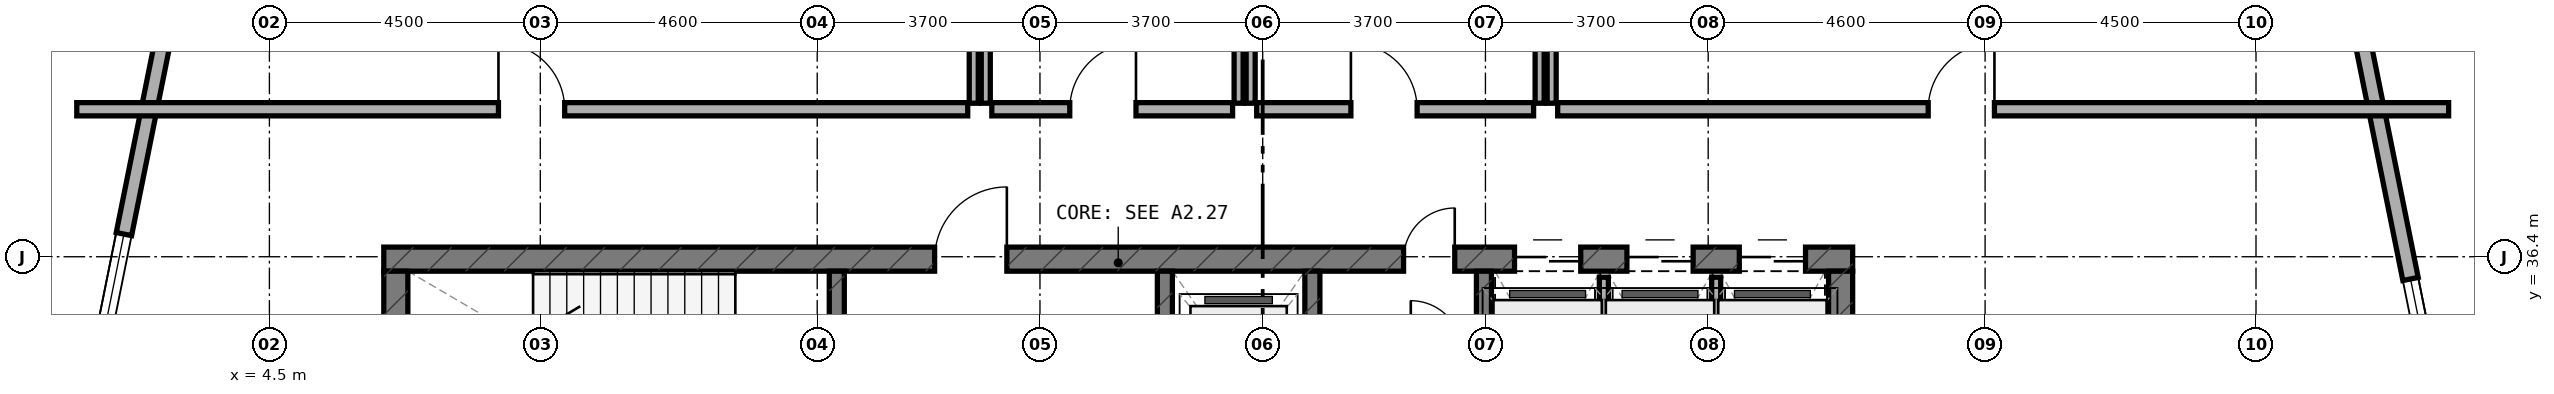
"""IFC4 building model, lengths in metres.
Left out: names, types, materials, properties, quantities, classifications, styles, units other than length and angle.
Written with IfcOpenShell. Run it as: python <this file> out.ifc"""

import sys

from ifc_helpers import new_model, si_unit, direction, frame, frame_2d, origin, place, context, subcontext, project, spatial, rectangle, extrude, element, fill, save


model = new_model("IFC4")
c1 = context("Model", 3, precision=1e-05, world=origin(), true_north=direction((0.0, 1.0)))
c2 = subcontext(c1, "Body", "Model", "MODEL_VIEW")
j1 = project(units=[si_unit("LENGTHUNIT", "METRE"), si_unit("PLANEANGLEUNIT", "RADIAN")], contexts=[c1])
p1 = place(None, origin())
s1 = spatial("IfcSite", under=j1, at=p1, CompositionType="ELEMENT")
p2 = place(p1, origin())
s2 = spatial("IfcBuilding", under=s1, at=p2, CompositionType="ELEMENT")
p3 = place(p2, frame((0.0, 0.0, 119.5)))
s3 = spatial("IfcBuildingStorey", under=s2, at=p3, CompositionType="ELEMENT", Elevation=119.5)
p4 = place(p3, frame((6.4, 36.36, 0.0), z_axis=(0.0, 0.0, 1.0), x_axis=(1.0, 0.0, 0.0)))
e1 = element("IfcWall", 1, at=p4, inside=s3, PredefinedType="SHEAR", context=c2, shape_type="SweptSolid", body=[
    extrude(rectangle(XDim=24.4, YDim=0.4, at=frame_2d((12.2, 0.0))), origin(), (0.0, 0.0, 1.0), 4.5),
])
p5 = place(p4, frame((9.15, 0.0, 0.0)))
e2 = element("IfcOpeningElement", 2, at=p5, cuts=e1, PredefinedType="OPENING", context=c2, shape_type="SweptSolid", body=[
    extrude(rectangle(XDim=1.2, YDim=2.15, at=frame_2d((0.6, 1.075))), frame((0.0, 0.21, 0.0), z_axis=(0.0, -1.0, 0.0), x_axis=(1.0, 0.0, 0.0)), (0.0, 0.0, 1.0), 0.42),
])
p6 = place(p4, frame((16.94, 0.0, 0.0)))
e3 = element("IfcOpeningElement", 3, at=p6, cuts=e1, PredefinedType="OPENING", context=c2, shape_type="SweptSolid", body=[
    extrude(rectangle(XDim=0.85, YDim=2.1, at=frame_2d((0.425, 1.05))), frame((0.0, 0.21, 0.0), z_axis=(0.0, -1.0, 0.0), x_axis=(1.0, 0.0, 0.0)), (0.0, 0.0, 1.0), 0.42),
])
p7 = place(p4, frame((18.783, 0.0, 0.0)))
e4 = element("IfcOpeningElement", 4, at=p7, cuts=e1, PredefinedType="OPENING", context=c2, shape_type="SweptSolid", body=[
    extrude(rectangle(XDim=1.1, YDim=2.15, at=frame_2d((0.55, 1.075))), frame((0.0, 0.21, 0.0), z_axis=(0.0, -1.0, 0.0), x_axis=(1.0, 0.0, 0.0)), (0.0, 0.0, 1.0), 0.42),
])
p8 = place(p4, frame((20.65, 0.0, 0.0)))
e5 = element("IfcOpeningElement", 5, at=p8, cuts=e1, PredefinedType="OPENING", context=c2, shape_type="SweptSolid", body=[
    extrude(rectangle(XDim=1.1, YDim=2.15, at=frame_2d((0.55, 1.075))), frame((0.0, 0.21, 0.0), z_axis=(0.0, -1.0, 0.0), x_axis=(1.0, 0.0, 0.0)), (0.0, 0.0, 1.0), 0.42),
])
p9 = place(p4, frame((22.517, 0.0, 0.0)))
e6 = element("IfcOpeningElement", 6, at=p9, cuts=e1, PredefinedType="OPENING", context=c2, shape_type="SweptSolid", body=[
    extrude(rectangle(XDim=1.1, YDim=2.15, at=frame_2d((0.55, 1.075))), frame((0.0, 0.21, 0.0), z_axis=(0.0, -1.0, 0.0), x_axis=(1.0, 0.0, 0.0)), (0.0, 0.0, 1.0), 0.42),
])
for number, where, z_axis, x_axis in (
    (7, (6.6, 33.0, 0.0), (0.0, 0.0, 1.0), (0.0, 1.0, 0.0)),
    (8, (30.6, 33.0, 0.0), (0.0, 0.0, 1.0), (0.0, 1.0, 0.0)),
):
    element("IfcWall", number, at=place(p3, frame(where, z_axis=z_axis, x_axis=x_axis)), inside=s3, PredefinedType="SHEAR", context=c2, shape_type="SweptSolid", body=[
        extrude(rectangle(XDim=3.16, YDim=0.4, at=frame_2d((1.58, 0.0))), origin(), (0.0, 0.0, 1.0), 4.5),
    ])
p10 = place(p3, frame((13.925, 33.0, 0.0), z_axis=(0.0, 0.0, 1.0), x_axis=(0.0, 1.0, 0.0)))
e9 = element("IfcWall", 9, at=p10, inside=s3, PredefinedType="STANDARD", context=c2, shape_type="SweptSolid", body=[
    extrude(rectangle(XDim=3.16, YDim=0.25, at=frame_2d((1.58, 0.0))), origin(), (0.0, 0.0, 1.0), 4.22),
])
p11 = place(p10, frame((0.98, 0.0, 0.0)))
e10 = element("IfcOpeningElement", 10, at=p11, cuts=e9, PredefinedType="OPENING", context=c2, shape_type="SweptSolid", body=[
    extrude(rectangle(XDim=1.1, YDim=2.15, at=frame_2d((0.55, 1.075))), frame((0.0, 0.135, 0.0), z_axis=(0.0, -1.0, 0.0), x_axis=(1.0, 0.0, 0.0)), (0.0, 0.0, 1.0), 0.27),
])
p12 = place(p3, frame((19.375, 33.0, 0.0), z_axis=(0.0, 0.0, 1.0), x_axis=(0.0, 1.0, 0.0)))
e11 = element("IfcWall", 11, at=p12, inside=s3, PredefinedType="STANDARD", context=c2, shape_type="SweptSolid", body=[
    extrude(rectangle(XDim=3.16, YDim=0.25, at=frame_2d((1.58, 0.0))), origin(), (0.0, 0.0, 1.0), 4.22),
])
p13 = place(p12, frame((0.98, 0.0, 0.0)))
e12 = element("IfcOpeningElement", 12, at=p13, cuts=e11, PredefinedType="OPENING", context=c2, shape_type="SweptSolid", body=[
    extrude(rectangle(XDim=1.1, YDim=2.15, at=frame_2d((0.55, 1.075))), frame((0.0, 0.135, 0.0), z_axis=(0.0, -1.0, 0.0), x_axis=(1.0, 0.0, 0.0)), (0.0, 0.0, 1.0), 0.27),
])
for number, where, z_axis, x_axis in (
    (13, (21.825, 33.0, 0.0), (0.0, 0.0, 1.0), (0.0, 1.0, 0.0)),
    (14, (24.675, 33.0, 0.0), (0.0, 0.0, 1.0), (0.0, 1.0, 0.0)),
):
    element("IfcWall", number, at=place(p3, frame(where, z_axis=z_axis, x_axis=x_axis)), inside=s3, PredefinedType="STANDARD", context=c2, shape_type="SweptSolid", body=[
        extrude(rectangle(XDim=3.16, YDim=0.25, at=frame_2d((1.58, 0.0))), origin(), (0.0, 0.0, 1.0), 4.22),
    ])
p14 = place(p3, frame((41.084, 30.98, 0.0), z_axis=(0.0, 0.0, 1.0), x_axis=(-0.197435082048, 0.980315963543, 0.0)))
e15 = element("IfcWall", 15, at=p14, inside=s3, PredefinedType="STANDARD", context=c2, shape_type="SweptSolid", body=[
    extrude(rectangle(XDim=9.183, YDim=0.26, at=frame_2d((4.591, 0.0))), origin(), (0.0, 0.0, 1.0), 4.22),
])
p15 = place(p14, frame((2.752, 0.0, 0.8)))
e16 = element("IfcOpeningElement", 16, at=p15, cuts=e15, PredefinedType="OPENING", context=c2, shape_type="SweptSolid", body=[
    extrude(rectangle(XDim=2.4, YDim=1.6, at=frame_2d((1.2, 0.8))), frame((0.0, 0.14, 0.0), z_axis=(0.0, -1.0, 0.0), x_axis=(1.0, 0.0, 0.0)), (0.0, 0.0, 1.0), 0.28),
])
p16 = place(p3, frame((2.729, 39.982, 0.0), z_axis=(0.0, 0.0, 1.0), x_axis=(-0.197435082048, -0.980315963543, 0.0)))
e17 = element("IfcWall", 17, at=p16, inside=s3, PredefinedType="STANDARD", context=c2, shape_type="SweptSolid", body=[
    extrude(rectangle(XDim=9.183, YDim=0.26, at=frame_2d((4.591, 0.0))), origin(), (0.0, 0.0, 1.0), 4.22),
])
p17 = place(p16, frame((3.27, 0.0, 0.8)))
e18 = element("IfcOpeningElement", 18, at=p17, cuts=e17, PredefinedType="OPENING", context=c2, shape_type="SweptSolid", body=[
    extrude(rectangle(XDim=2.4, YDim=1.6, at=frame_2d((1.2, 0.8))), frame((0.0, 0.14, 0.0), z_axis=(0.0, -1.0, 0.0), x_axis=(1.0, 0.0, 0.0)), (0.0, 0.0, 1.0), 0.28),
])
p18 = place(p3, frame((26.667, 33.1, 0.0), z_axis=(0.0, 0.0, 1.0), x_axis=(0.0, 1.0, 0.0)))
e19 = element("IfcWall", 19, at=p18, inside=s3, PredefinedType="PARTITIONING", context=c2, shape_type="SweptSolid", body=[
    extrude(rectangle(XDim=2.96, YDim=0.15, at=frame_2d((1.48, 0.0))), origin(), (0.0, 0.0, 1.0), 4.22),
])
p19 = place(p3, frame((28.533, 33.1, 0.0), z_axis=(0.0, 0.0, 1.0), x_axis=(0.0, 1.0, 0.0)))
e20 = element("IfcWall", 20, at=p19, inside=s3, PredefinedType="PARTITIONING", context=c2, shape_type="SweptSolid", body=[
    extrude(rectangle(XDim=2.96, YDim=0.15, at=frame_2d((1.48, 0.0))), origin(), (0.0, 0.0, 1.0), 3.695),
])
p20 = place(p3, frame((16.2, 38.95, 0.0), z_axis=(0.0, 0.0, 1.0), x_axis=(0.0, 1.0, 0.0)))
e21 = element("IfcWall", 21, at=p20, inside=s3, PredefinedType="PARTITIONING", context=c2, shape_type="SweptSolid", body=[
    extrude(rectangle(XDim=5.75, YDim=0.15, at=frame_2d((2.875, 0.0))), origin(), (0.0, 0.0, 1.0), 3.695),
])
p21 = place(p3, frame((1.3, 38.85, 0.0), z_axis=(0.0, 0.0, 1.0), x_axis=(1.0, 0.0, 0.0)))
e22 = element("IfcWall", 22, at=p21, inside=s3, PredefinedType="SOLIDWALL", context=c2, shape_type="SweptSolid", body=[
    extrude(rectangle(XDim=14.8, YDim=0.22, at=frame_2d((7.4, 0.0))), origin(), (0.0, 0.0, 1.0), 3.695),
])
p22 = place(p21, frame((7.005, 0.0, 0.0)))
e23 = element("IfcOpeningElement", 23, at=p22, cuts=e22, PredefinedType="OPENING", context=c2, shape_type="SweptSolid", body=[
    extrude(rectangle(XDim=1.1, YDim=2.1, at=frame_2d((0.55, 1.05))), frame((0.0, 0.12, 0.0), z_axis=(0.0, -1.0, 0.0), x_axis=(1.0, 0.0, 0.0)), (0.0, 0.0, 1.0), 0.24),
])
p23 = place(p3, frame((16.4, 38.95, 0.0), z_axis=(0.0, 0.0, 1.0), x_axis=(0.0, 1.0, 0.0)))
e24 = element("IfcWall", 24, at=p23, inside=s3, PredefinedType="PARTITIONING", context=c2, shape_type="SweptSolid", body=[
    extrude(rectangle(XDim=5.75, YDim=0.15, at=frame_2d((2.875, 0.0))), origin(), (0.0, 0.0, 1.0), 3.695),
])
p24 = place(p3, frame((20.6, 38.95, 0.0), z_axis=(0.0, 0.0, 1.0), x_axis=(0.0, 1.0, 0.0)))
e25 = element("IfcWall", 25, at=p24, inside=s3, PredefinedType="PARTITIONING", context=c2, shape_type="SweptSolid", body=[
    extrude(rectangle(XDim=5.75, YDim=0.15, at=frame_2d((2.875, 0.0))), origin(), (0.0, 0.0, 1.0), 3.835),
])
p25 = place(p3, frame((16.5, 38.85, 0.0), z_axis=(0.0, 0.0, 1.0), x_axis=(1.0, 0.0, 0.0)))
e26 = element("IfcWall", 26, at=p25, inside=s3, PredefinedType="SOLIDWALL", context=c2, shape_type="SweptSolid", body=[
    extrude(rectangle(XDim=4.0, YDim=0.22, at=frame_2d((2.0, 0.0))), origin(), (0.0, 0.0, 1.0), 4.22),
])
p26 = place(p25, frame((1.295, 0.0, 0.0)))
e27 = element("IfcOpeningElement", 27, at=p26, cuts=e26, PredefinedType="OPENING", context=c2, shape_type="SweptSolid", body=[
    extrude(rectangle(XDim=1.1, YDim=2.1, at=frame_2d((0.55, 1.05))), frame((0.0, 0.12, 0.0), z_axis=(0.0, -1.0, 0.0), x_axis=(1.0, 0.0, 0.0)), (0.0, 0.0, 1.0), 0.24),
])
p27 = place(p3, frame((20.8, 38.95, 0.0), z_axis=(0.0, 0.0, 1.0), x_axis=(0.0, 1.0, 0.0)))
e28 = element("IfcWall", 28, at=p27, inside=s3, PredefinedType="PARTITIONING", context=c2, shape_type="SweptSolid", body=[
    extrude(rectangle(XDim=5.75, YDim=0.15, at=frame_2d((2.875, 0.0))), origin(), (0.0, 0.0, 1.0), 3.835),
])
p28 = place(p3, frame((25.6, 38.95, 0.0), z_axis=(0.0, 0.0, 1.0), x_axis=(0.0, 1.0, 0.0)))
e29 = element("IfcWall", 29, at=p28, inside=s3, PredefinedType="PARTITIONING", context=c2, shape_type="SweptSolid", body=[
    extrude(rectangle(XDim=5.75, YDim=0.15, at=frame_2d((2.875, 0.0))), origin(), (0.0, 0.0, 1.0), 3.695),
])
p29 = place(p3, frame((20.9, 38.85, 0.0), z_axis=(0.0, 0.0, 1.0), x_axis=(1.0, 0.0, 0.0)))
e30 = element("IfcWall", 30, at=p29, inside=s3, PredefinedType="SOLIDWALL", context=c2, shape_type="SweptSolid", body=[
    extrude(rectangle(XDim=4.6, YDim=0.22, at=frame_2d((2.3, 0.0))), origin(), (0.0, 0.0, 1.0), 4.22),
])
p30 = place(p29, frame((1.565, 0.0, 0.0)))
e31 = element("IfcOpeningElement", 31, at=p30, cuts=e30, PredefinedType="OPENING", context=c2, shape_type="SweptSolid", body=[
    extrude(rectangle(XDim=1.1, YDim=2.1, at=frame_2d((0.55, 1.05))), frame((0.0, 0.12, 0.0), z_axis=(0.0, -1.0, 0.0), x_axis=(1.0, 0.0, 0.0)), (0.0, 0.0, 1.0), 0.24),
])
p31 = place(p3, frame((25.8, 38.95, 0.0), z_axis=(0.0, 0.0, 1.0), x_axis=(0.0, 1.0, 0.0)))
e32 = element("IfcWall", 32, at=p31, inside=s3, PredefinedType="PARTITIONING", context=c2, shape_type="SweptSolid", body=[
    extrude(rectangle(XDim=5.75, YDim=0.15, at=frame_2d((2.875, 0.0))), origin(), (0.0, 0.0, 1.0), 3.695),
])
p32 = place(p3, frame((25.9, 38.85, 0.0), z_axis=(0.0, 0.0, 1.0), x_axis=(1.0, 0.0, 0.0)))
e33 = element("IfcWall", 33, at=p32, inside=s3, PredefinedType="SOLIDWALL", context=c2, shape_type="SweptSolid", body=[
    extrude(rectangle(XDim=14.8, YDim=0.22, at=frame_2d((7.4, 0.0))), origin(), (0.0, 0.0, 1.0), 3.695),
])
p33 = place(p32, frame((6.155, 0.0, 0.0)))
e34 = element("IfcOpeningElement", 34, at=p33, cuts=e33, PredefinedType="OPENING", context=c2, shape_type="SweptSolid", body=[
    extrude(rectangle(XDim=1.1, YDim=2.1, at=frame_2d((0.55, 1.05))), frame((0.0, 0.12, 0.0), z_axis=(0.0, -1.0, 0.0), x_axis=(1.0, 0.0, 0.0)), (0.0, 0.0, 1.0), 0.24),
])
p34 = place(p15, origin())
e35 = element("IfcWindow", 35, at=p34, inside=s3, PartitioningType="SINGLE_PANEL", PredefinedType="WINDOW", context=c2, shape_type="SweptSolid", body=[
    extrude(rectangle(XDim=2.4, YDim=1.6, at=frame_2d((1.2, 0.8))), frame((0.0, 0.03, 0.0), z_axis=(0.0, -1.0, 0.0), x_axis=(1.0, 0.0, 0.0)), (0.0, 0.0, 1.0), 0.06),
])
fill(e16, e35)
p35 = place(p17, origin())
e36 = element("IfcWindow", 36, at=p35, inside=s3, PartitioningType="SINGLE_PANEL", PredefinedType="WINDOW", context=c2, shape_type="SweptSolid", body=[
    extrude(rectangle(XDim=2.4, YDim=1.6, at=frame_2d((1.2, 0.8))), frame((0.0, 0.03, 0.0), z_axis=(0.0, -1.0, 0.0), x_axis=(1.0, 0.0, 0.0)), (0.0, 0.0, 1.0), 0.06),
])
fill(e18, e36)
p36 = place(p5, origin())
e37 = element("IfcDoor", 37, at=p36, inside=s3, OperationType="SINGLE_SWING_RIGHT", PredefinedType="DOOR", context=c2, shape_type="SweptSolid", body=[
    extrude(rectangle(XDim=1.2, YDim=2.15, at=frame_2d((0.6, 1.075))), frame((0.0, 0.025, 0.0), z_axis=(0.0, -1.0, 0.0), x_axis=(1.0, 0.0, 0.0)), (0.0, 0.0, 1.0), 0.05),
])
fill(e2, e37)
p37 = place(p6, origin())
e38 = element("IfcDoor", 38, at=p37, inside=s3, OperationType="SINGLE_SWING_RIGHT", PredefinedType="DOOR", context=c2, shape_type="SweptSolid", body=[
    extrude(rectangle(XDim=0.85, YDim=2.1, at=frame_2d((0.425, 1.05))), frame((0.0, 0.025, 0.0), z_axis=(0.0, -1.0, 0.0), x_axis=(1.0, 0.0, 0.0)), (0.0, 0.0, 1.0), 0.05),
])
fill(e3, e38)
p38 = place(p7, origin())
e39 = element("IfcDoor", 39, at=p38, inside=s3, OperationType="DOUBLE_DOOR_SLIDING", PredefinedType="DOOR", context=c2, shape_type="SweptSolid", body=[
    extrude(rectangle(XDim=1.1, YDim=2.15, at=frame_2d((0.55, 1.075))), frame((0.0, 0.025, 0.0), z_axis=(0.0, -1.0, 0.0), x_axis=(1.0, 0.0, 0.0)), (0.0, 0.0, 1.0), 0.05),
])
fill(e4, e39)
p39 = place(p8, origin())
e40 = element("IfcDoor", 40, at=p39, inside=s3, OperationType="DOUBLE_DOOR_SLIDING", PredefinedType="DOOR", context=c2, shape_type="SweptSolid", body=[
    extrude(rectangle(XDim=1.1, YDim=2.15, at=frame_2d((0.55, 1.075))), frame((0.0, 0.025, 0.0), z_axis=(0.0, -1.0, 0.0), x_axis=(1.0, 0.0, 0.0)), (0.0, 0.0, 1.0), 0.05),
])
fill(e5, e40)
p40 = place(p9, origin())
e41 = element("IfcDoor", 41, at=p40, inside=s3, OperationType="DOUBLE_DOOR_SLIDING", PredefinedType="DOOR", context=c2, shape_type="SweptSolid", body=[
    extrude(rectangle(XDim=1.1, YDim=2.15, at=frame_2d((0.55, 1.075))), frame((0.0, 0.025, 0.0), z_axis=(0.0, -1.0, 0.0), x_axis=(1.0, 0.0, 0.0)), (0.0, 0.0, 1.0), 0.05),
])
fill(e6, e41)
p41 = place(p22, origin())
e42 = element("IfcDoor", 42, at=p41, inside=s3, OperationType="SINGLE_SWING_LEFT", PredefinedType="DOOR", context=c2, shape_type="SweptSolid", body=[
    extrude(rectangle(XDim=1.1, YDim=2.1, at=frame_2d((0.55, 1.05))), frame((0.0, 0.025, 0.0), z_axis=(0.0, -1.0, 0.0), x_axis=(1.0, 0.0, 0.0)), (0.0, 0.0, 1.0), 0.05),
])
fill(e23, e42)
p42 = place(p26, origin())
e43 = element("IfcDoor", 43, at=p42, inside=s3, OperationType="SINGLE_SWING_RIGHT", PredefinedType="DOOR", context=c2, shape_type="SweptSolid", body=[
    extrude(rectangle(XDim=1.1, YDim=2.1, at=frame_2d((0.55, 1.05))), frame((0.0, 0.025, 0.0), z_axis=(0.0, -1.0, 0.0), x_axis=(1.0, 0.0, 0.0)), (0.0, 0.0, 1.0), 0.05),
])
fill(e27, e43)
p43 = place(p30, origin())
e44 = element("IfcDoor", 44, at=p43, inside=s3, OperationType="SINGLE_SWING_LEFT", PredefinedType="DOOR", context=c2, shape_type="SweptSolid", body=[
    extrude(rectangle(XDim=1.1, YDim=2.1, at=frame_2d((0.55, 1.05))), frame((0.0, 0.025, 0.0), z_axis=(0.0, -1.0, 0.0), x_axis=(1.0, 0.0, 0.0)), (0.0, 0.0, 1.0), 0.05),
])
fill(e31, e44)
p44 = place(p33, origin())
e45 = element("IfcDoor", 45, at=p44, inside=s3, OperationType="SINGLE_SWING_RIGHT", PredefinedType="DOOR", context=c2, shape_type="SweptSolid", body=[
    extrude(rectangle(XDim=1.1, YDim=2.1, at=frame_2d((0.55, 1.05))), frame((0.0, 0.025, 0.0), z_axis=(0.0, -1.0, 0.0), x_axis=(1.0, 0.0, 0.0)), (0.0, 0.0, 1.0), 0.05),
])
fill(e34, e45)
save(model, sys.argv[1])
